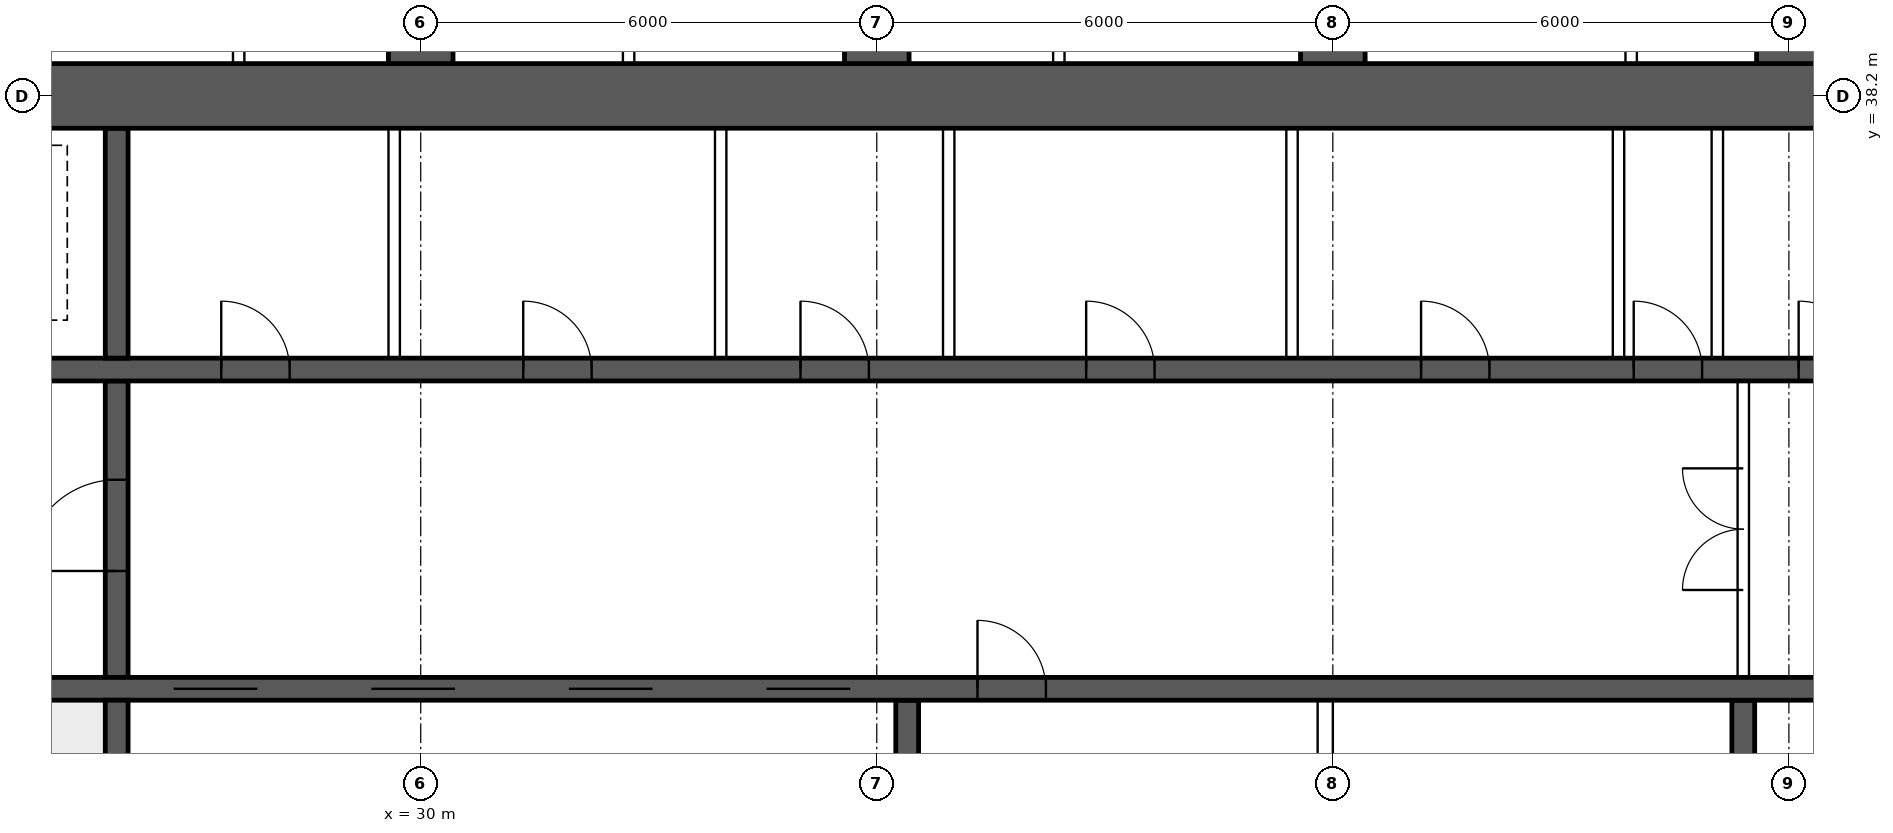
"""IFC4 building model, lengths in metres.
Left out: names, types, materials, properties, quantities, classifications, styles, units other than length and angle.
Written with IfcOpenShell. Run it as: python <this file> out.ifc"""

import sys

from ifc_helpers import new_model, si_unit, direction, frame, frame_2d, origin, place, context, subcontext, project, spatial, rectangle, extrude, element, fill, save


model = new_model("IFC4")
c1 = context("Model", 3, precision=1e-05, world=origin(), true_north=direction((0.0, 1.0)))
c2 = subcontext(c1, "Body", "Model", "MODEL_VIEW")
j1 = project(units=[si_unit("LENGTHUNIT", "METRE"), si_unit("PLANEANGLEUNIT", "RADIAN")], contexts=[c1])
p1 = place(None, origin())
s1 = spatial("IfcSite", under=j1, at=p1, CompositionType="ELEMENT")
p2 = place(p1, origin())
s2 = spatial("IfcBuilding", under=s1, at=p2, CompositionType="ELEMENT")
p3 = place(p2, frame((0.0, 0.0, 193.6)))
s3 = spatial("IfcBuildingStorey", under=s2, at=p3, CompositionType="ELEMENT", Elevation=193.6)
p4 = place(p3, frame((18.0, 38.2, 0.0), z_axis=(0.0, 0.0, 1.0), x_axis=(1.0, 0.0, 0.0)))
e1 = element("IfcWall", 1, at=p4, inside=s3, PredefinedType="SHEAR", context=c2, shape_type="SweptSolid", body=[
    extrude(rectangle(XDim=48.0, YDim=0.85, at=frame_2d((24.0, 0.0))), origin(), (0.0, 0.0, 1.0), 3.75),
])
p5 = place(p3, frame((18.425, 30.4, 0.0), z_axis=(0.0, 0.0, 1.0), x_axis=(1.0, 0.0, 0.0)))
e2 = element("IfcWall", 2, at=p5, inside=s3, PredefinedType="SHEAR", context=c2, shape_type="SweptSolid", body=[
    extrude(rectangle(XDim=47.15, YDim=0.3, at=frame_2d((23.575, 0.0))), origin(), (0.0, 0.0, 1.0), 3.75),
])
p6 = place(p5, frame((0.4, 0.0, 0.0)))
e3 = element("IfcOpeningElement", 3, at=p6, cuts=e2, PredefinedType="OPENING", context=c2, shape_type="SweptSolid", body=[
    extrude(rectangle(XDim=1.0, YDim=2.1, at=frame_2d((0.5, 1.05))), frame((0.0, 0.16, 0.0), z_axis=(0.0, -1.0, 0.0), x_axis=(1.0, 0.0, 0.0)), (0.0, 0.0, 1.0), 0.32),
])
p7 = place(p5, frame((45.75, 0.0, 0.0)))
e4 = element("IfcOpeningElement", 4, at=p7, cuts=e2, PredefinedType="OPENING", context=c2, shape_type="SweptSolid", body=[
    extrude(rectangle(XDim=1.0, YDim=2.1, at=frame_2d((0.5, 1.05))), frame((0.0, 0.16, 0.0), z_axis=(0.0, -1.0, 0.0), x_axis=(1.0, 0.0, 0.0)), (0.0, 0.0, 1.0), 0.32),
])
p8 = place(p5, frame((8.325, 0.0, 0.0)))
e5 = element("IfcOpeningElement", 5, at=p8, cuts=e2, PredefinedType="OPENING", context=c2, shape_type="SweptSolid", body=[
    extrude(rectangle(XDim=1.1, YDim=2.1, at=frame_2d((0.55, 1.05))), frame((0.0, 0.16, 0.0), z_axis=(0.0, -1.0, 0.0), x_axis=(1.0, 0.0, 0.0)), (0.0, 0.0, 1.0), 0.32),
])
p9 = place(p5, frame((10.925, 0.0, 0.0)))
e6 = element("IfcOpeningElement", 6, at=p9, cuts=e2, PredefinedType="OPENING", context=c2, shape_type="SweptSolid", body=[
    extrude(rectangle(XDim=1.1, YDim=2.1, at=frame_2d((0.55, 1.05))), frame((0.0, 0.16, 0.0), z_axis=(0.0, -1.0, 0.0), x_axis=(1.0, 0.0, 0.0)), (0.0, 0.0, 1.0), 0.32),
])
p10 = place(p5, frame((13.525, 0.0, 0.0)))
e7 = element("IfcOpeningElement", 7, at=p10, cuts=e2, PredefinedType="OPENING", context=c2, shape_type="SweptSolid", body=[
    extrude(rectangle(XDim=1.1, YDim=2.1, at=frame_2d((0.55, 1.05))), frame((0.0, 0.16, 0.0), z_axis=(0.0, -1.0, 0.0), x_axis=(1.0, 0.0, 0.0)), (0.0, 0.0, 1.0), 0.32),
])
p11 = place(p5, frame((16.125, 0.0, 0.0)))
e8 = element("IfcOpeningElement", 8, at=p11, cuts=e2, PredefinedType="OPENING", context=c2, shape_type="SweptSolid", body=[
    extrude(rectangle(XDim=1.1, YDim=2.1, at=frame_2d((0.55, 1.05))), frame((0.0, 0.16, 0.0), z_axis=(0.0, -1.0, 0.0), x_axis=(1.0, 0.0, 0.0)), (0.0, 0.0, 1.0), 0.32),
])
p12 = place(p5, frame((18.9, 0.0, 0.0)))
e9 = element("IfcOpeningElement", 9, at=p12, cuts=e2, PredefinedType="OPENING", context=c2, shape_type="SweptSolid", body=[
    extrude(rectangle(XDim=0.9, YDim=2.1, at=frame_2d((0.45, 1.05))), frame((0.0, 0.16, 0.0), z_axis=(0.0, -1.0, 0.0), x_axis=(1.0, 0.0, 0.0)), (0.0, 0.0, 1.0), 0.32),
])
p13 = place(p5, frame((30.192, 0.0, 0.0)))
e10 = element("IfcOpeningElement", 10, at=p13, cuts=e2, PredefinedType="OPENING", context=c2, shape_type="SweptSolid", body=[
    extrude(rectangle(XDim=1.1, YDim=2.1, at=frame_2d((0.55, 1.05))), frame((0.0, 0.16, 0.0), z_axis=(0.0, -1.0, 0.0), x_axis=(1.0, 0.0, 0.0)), (0.0, 0.0, 1.0), 0.32),
])
p14 = place(p5, frame((33.725, 0.0, 0.0)))
e11 = element("IfcOpeningElement", 11, at=p14, cuts=e2, PredefinedType="OPENING", context=c2, shape_type="SweptSolid", body=[
    extrude(rectangle(XDim=1.1, YDim=2.1, at=frame_2d((0.55, 1.05))), frame((0.0, 0.16, 0.0), z_axis=(0.0, -1.0, 0.0), x_axis=(1.0, 0.0, 0.0)), (0.0, 0.0, 1.0), 0.32),
])
p15 = place(p5, frame((37.258, 0.0, 0.0)))
e12 = element("IfcOpeningElement", 12, at=p15, cuts=e2, PredefinedType="OPENING", context=c2, shape_type="SweptSolid", body=[
    extrude(rectangle(XDim=1.1, YDim=2.1, at=frame_2d((0.55, 1.05))), frame((0.0, 0.16, 0.0), z_axis=(0.0, -1.0, 0.0), x_axis=(1.0, 0.0, 0.0)), (0.0, 0.0, 1.0), 0.32),
])
p16 = place(p3, frame((18.425, 34.6, 0.0), z_axis=(0.0, 0.0, 1.0), x_axis=(1.0, 0.0, 0.0)))
e13 = element("IfcWall", 13, at=p16, inside=s3, PredefinedType="SHEAR", context=c2, shape_type="SweptSolid", body=[
    extrude(rectangle(XDim=47.15, YDim=0.3, at=frame_2d((23.575, 0.0))), origin(), (0.0, 0.0, 1.0), 3.75),
])
p17 = place(p16, frame((0.9, 0.0, 0.0)))
e14 = element("IfcOpeningElement", 14, at=p17, cuts=e13, PredefinedType="OPENING", context=c2, shape_type="SweptSolid", body=[
    extrude(rectangle(XDim=1.1, YDim=2.1, at=frame_2d((0.55, 1.05))), frame((0.0, 0.16, 0.0), z_axis=(0.0, -1.0, 0.0), x_axis=(1.0, 0.0, 0.0)), (0.0, 0.0, 1.0), 0.32),
])
p18 = place(p16, frame((45.15, 0.0, 0.0)))
e15 = element("IfcOpeningElement", 15, at=p18, cuts=e13, PredefinedType="OPENING", context=c2, shape_type="SweptSolid", body=[
    extrude(rectangle(XDim=1.1, YDim=2.1, at=frame_2d((0.55, 1.05))), frame((0.0, 0.16, 0.0), z_axis=(0.0, -1.0, 0.0), x_axis=(1.0, 0.0, 0.0)), (0.0, 0.0, 1.0), 0.32),
])
p19 = place(p16, frame((4.175, 0.0, 0.0)))
e16 = element("IfcOpeningElement", 16, at=p19, cuts=e13, PredefinedType="OPENING", context=c2, shape_type="SweptSolid", body=[
    extrude(rectangle(XDim=0.9, YDim=2.1, at=frame_2d((0.45, 1.05))), frame((0.0, 0.16, 0.0), z_axis=(0.0, -1.0, 0.0), x_axis=(1.0, 0.0, 0.0)), (0.0, 0.0, 1.0), 0.32),
])
p20 = place(p16, frame((42.075, 0.0, 0.0)))
e17 = element("IfcOpeningElement", 17, at=p20, cuts=e13, PredefinedType="OPENING", context=c2, shape_type="SweptSolid", body=[
    extrude(rectangle(XDim=0.9, YDim=2.1, at=frame_2d((0.45, 1.05))), frame((0.0, 0.16, 0.0), z_axis=(0.0, -1.0, 0.0), x_axis=(1.0, 0.0, 0.0)), (0.0, 0.0, 1.0), 0.32),
])
p21 = place(p16, frame((8.95, 0.0, 0.0)))
e18 = element("IfcOpeningElement", 18, at=p21, cuts=e13, PredefinedType="OPENING", context=c2, shape_type="SweptSolid", body=[
    extrude(rectangle(XDim=0.9, YDim=2.1, at=frame_2d((0.45, 1.05))), frame((0.0, 0.16, 0.0), z_axis=(0.0, -1.0, 0.0), x_axis=(1.0, 0.0, 0.0)), (0.0, 0.0, 1.0), 0.32),
])
p22 = place(p16, frame((12.924, 0.0, 0.0)))
e19 = element("IfcOpeningElement", 19, at=p22, cuts=e13, PredefinedType="OPENING", context=c2, shape_type="SweptSolid", body=[
    extrude(rectangle(XDim=0.9, YDim=2.1, at=frame_2d((0.45, 1.05))), frame((0.0, 0.16, 0.0), z_axis=(0.0, -1.0, 0.0), x_axis=(1.0, 0.0, 0.0)), (0.0, 0.0, 1.0), 0.32),
])
p23 = place(p16, frame((16.571, 0.0, 0.0)))
e20 = element("IfcOpeningElement", 20, at=p23, cuts=e13, PredefinedType="OPENING", context=c2, shape_type="SweptSolid", body=[
    extrude(rectangle(XDim=0.9, YDim=2.1, at=frame_2d((0.45, 1.05))), frame((0.0, 0.16, 0.0), z_axis=(0.0, -1.0, 0.0), x_axis=(1.0, 0.0, 0.0)), (0.0, 0.0, 1.0), 0.32),
])
p24 = place(p16, frame((20.33, 0.0, 0.0)))
e21 = element("IfcOpeningElement", 21, at=p24, cuts=e13, PredefinedType="OPENING", context=c2, shape_type="SweptSolid", body=[
    extrude(rectangle(XDim=0.9, YDim=2.1, at=frame_2d((0.45, 1.05))), frame((0.0, 0.16, 0.0), z_axis=(0.0, -1.0, 0.0), x_axis=(1.0, 0.0, 0.0)), (0.0, 0.0, 1.0), 0.32),
])
p25 = place(p16, frame((24.736, 0.0, 0.0)))
e22 = element("IfcOpeningElement", 22, at=p25, cuts=e13, PredefinedType="OPENING", context=c2, shape_type="SweptSolid", body=[
    extrude(rectangle(XDim=0.9, YDim=2.1, at=frame_2d((0.45, 1.05))), frame((0.0, 0.16, 0.0), z_axis=(0.0, -1.0, 0.0), x_axis=(1.0, 0.0, 0.0)), (0.0, 0.0, 1.0), 0.32),
])
p26 = place(p16, frame((27.533, 0.0, 0.0)))
e23 = element("IfcOpeningElement", 23, at=p26, cuts=e13, PredefinedType="OPENING", context=c2, shape_type="SweptSolid", body=[
    extrude(rectangle(XDim=0.9, YDim=2.1, at=frame_2d((0.45, 1.05))), frame((0.0, 0.16, 0.0), z_axis=(0.0, -1.0, 0.0), x_axis=(1.0, 0.0, 0.0)), (0.0, 0.0, 1.0), 0.32),
])
p27 = place(p16, frame((29.703, 0.0, 0.0)))
e24 = element("IfcOpeningElement", 24, at=p27, cuts=e13, PredefinedType="OPENING", context=c2, shape_type="SweptSolid", body=[
    extrude(rectangle(XDim=0.9, YDim=2.1, at=frame_2d((0.45, 1.05))), frame((0.0, 0.16, 0.0), z_axis=(0.0, -1.0, 0.0), x_axis=(1.0, 0.0, 0.0)), (0.0, 0.0, 1.0), 0.32),
])
p28 = place(p16, frame((33.502, 0.0, 0.0)))
e25 = element("IfcOpeningElement", 25, at=p28, cuts=e13, PredefinedType="OPENING", context=c2, shape_type="SweptSolid", body=[
    extrude(rectangle(XDim=0.9, YDim=2.1, at=frame_2d((0.45, 1.05))), frame((0.0, 0.16, 0.0), z_axis=(0.0, -1.0, 0.0), x_axis=(1.0, 0.0, 0.0)), (0.0, 0.0, 1.0), 0.32),
])
p29 = place(p16, frame((37.453, 0.0, 0.0)))
e26 = element("IfcOpeningElement", 26, at=p29, cuts=e13, PredefinedType="OPENING", context=c2, shape_type="SweptSolid", body=[
    extrude(rectangle(XDim=0.9, YDim=2.1, at=frame_2d((0.45, 1.05))), frame((0.0, 0.16, 0.0), z_axis=(0.0, -1.0, 0.0), x_axis=(1.0, 0.0, 0.0)), (0.0, 0.0, 1.0), 0.32),
])
p30 = place(p3, frame((26.0, 26.225, 0.0), z_axis=(0.0, 0.0, 1.0), x_axis=(0.0, 1.0, 0.0)))
e27 = element("IfcWall", 27, at=p30, inside=s3, PredefinedType="SHEAR", context=c2, shape_type="SweptSolid", body=[
    extrude(rectangle(XDim=4.025, YDim=0.3, at=frame_2d((2.012, 0.0))), origin(), (0.0, 0.0, 1.0), 3.75),
])
p31 = place(p3, frame((26.0, 30.55, 0.0), z_axis=(0.0, 0.0, 1.0), x_axis=(0.0, 1.0, 0.0)))
e28 = element("IfcWall", 28, at=p31, inside=s3, PredefinedType="SHEAR", context=c2, shape_type="SweptSolid", body=[
    extrude(rectangle(XDim=3.9, YDim=0.3, at=frame_2d((1.95, 0.0))), origin(), (0.0, 0.0, 1.0), 3.75),
])
p32 = place(p31, frame((1.4, 0.0, 0.0)))
e29 = element("IfcOpeningElement", 29, at=p32, cuts=e28, PredefinedType="OPENING", context=c2, shape_type="SweptSolid", body=[
    extrude(rectangle(XDim=1.2, YDim=2.1, at=frame_2d((0.6, 1.05))), frame((0.0, 0.16, 0.0), z_axis=(0.0, -1.0, 0.0), x_axis=(1.0, 0.0, 0.0)), (0.0, 0.0, 1.0), 0.32),
])
p33 = place(p3, frame((26.0, 34.75, 0.0), z_axis=(0.0, 0.0, 1.0), x_axis=(0.0, 1.0, 0.0)))
e30 = element("IfcWall", 30, at=p33, inside=s3, PredefinedType="SHEAR", context=c2, shape_type="SweptSolid", body=[
    extrude(rectangle(XDim=3.025, YDim=0.3, at=frame_2d((1.512, 0.0))), origin(), (0.0, 0.0, 1.0), 3.75),
])
for number, where, z_axis, x_axis in (
    (31, (36.4, 26.225, 0.0), (0.0, 0.0, 1.0), (0.0, 1.0, 0.0)),
    (32, (47.4, 26.225, 0.0), (0.0, 0.0, 1.0), (0.0, 1.0, 0.0)),
):
    element("IfcWall", number, at=place(p3, frame(where, z_axis=z_axis, x_axis=x_axis)), inside=s3, PredefinedType="SHEAR", context=c2, shape_type="SweptSolid", body=[
        extrude(rectangle(XDim=4.025, YDim=0.3, at=frame_2d((2.012, 0.0))), origin(), (0.0, 0.0, 1.0), 3.75),
    ])
for number, where, z_axis, x_axis in (
    (33, (30.0, 38.625, 0.0), (0.0, 0.0, 1.0), (0.0, 1.0, 0.0)),
    (34, (36.0, 38.625, 0.0), (0.0, 0.0, 1.0), (0.0, 1.0, 0.0)),
    (35, (42.0, 38.625, 0.0), (0.0, 0.0, 1.0), (0.0, 1.0, 0.0)),
    (36, (48.0, 38.625, 0.0), (0.0, 0.0, 1.0), (0.0, 1.0, 0.0)),
):
    element("IfcWall", number, at=place(p3, frame(where, z_axis=z_axis, x_axis=x_axis)), inside=s3, PredefinedType="SHEAR", context=c2, shape_type="SweptSolid", body=[
        extrude(rectangle(XDim=8.175, YDim=0.85, at=frame_2d((4.087, 0.0))), origin(), (0.0, 0.0, 1.0), 3.75),
    ])
p34 = place(p3, frame((47.4, 30.55, 0.0), z_axis=(0.0, 0.0, 1.0), x_axis=(0.0, 1.0, 0.0)))
e37 = element("IfcWall", 37, at=p34, inside=s3, PredefinedType="SOLIDWALL", context=c2, shape_type="SweptSolid", body=[
    extrude(rectangle(XDim=3.9, YDim=0.15, at=frame_2d((1.95, 0.0))), origin(), (0.0, 0.0, 1.0), 3.5),
])
p35 = place(p34, frame((1.15, 0.0, 0.0)))
e38 = element("IfcOpeningElement", 38, at=p35, cuts=e37, PredefinedType="OPENING", context=c2, shape_type="SweptSolid", body=[
    extrude(rectangle(XDim=1.6, YDim=2.1, at=frame_2d((0.8, 1.05))), frame((0.0, 0.085, 0.0), z_axis=(0.0, -1.0, 0.0), x_axis=(1.0, 0.0, 0.0)), (0.0, 0.0, 1.0), 0.17),
])
for number, where, z_axis, x_axis in (
    (39, (29.651, 34.75, 0.0), (0.0, 0.0, 1.0), (0.0, 1.0, 0.0)),
    (40, (33.946, 34.75, 0.0), (0.0, 0.0, 1.0), (0.0, 1.0, 0.0)),
    (41, (36.946, 34.75, 0.0), (0.0, 0.0, 1.0), (0.0, 1.0, 0.0)),
    (42, (41.463, 34.75, 0.0), (0.0, 0.0, 1.0), (0.0, 1.0, 0.0)),
    (43, (45.758, 34.75, 0.0), (0.0, 0.0, 1.0), (0.0, 1.0, 0.0)),
    (44, (47.058, 34.75, 0.0), (0.0, 0.0, 1.0), (0.0, 1.0, 0.0)),
):
    element("IfcWall", number, at=place(p3, frame(where, z_axis=z_axis, x_axis=x_axis)), inside=s3, PredefinedType="SOLIDWALL", context=c2, shape_type="SweptSolid", body=[
        extrude(rectangle(XDim=3.025, YDim=0.15, at=frame_2d((1.512, 0.0))), origin(), (0.0, 0.0, 1.0), 3.5),
    ])
p36 = place(p3, frame((41.9, 26.225, 0.0), z_axis=(0.0, 0.0, 1.0), x_axis=(0.0, 1.0, 0.0)))
e45 = element("IfcWall", 45, at=p36, inside=s3, PredefinedType="SOLIDWALL", context=c2, shape_type="SweptSolid", body=[
    extrude(rectangle(XDim=4.025, YDim=0.2, at=frame_2d((2.012, 0.0))), origin(), (0.0, 0.0, 1.0), 3.5),
])
for number, where, z_axis, x_axis in (
    (46, (27.605, 38.625, 0.0), (0.0, 0.0, 1.0), (0.0, 1.0, 0.0)),
    (47, (32.735, 38.625, 0.0), (0.0, 0.0, 1.0), (0.0, 1.0, 0.0)),
    (48, (38.395, 38.625, 0.0), (0.0, 0.0, 1.0), (0.0, 1.0, 0.0)),
    (49, (45.925, 38.625, 0.0), (0.0, 0.0, 1.0), (0.0, 1.0, 0.0)),
):
    element("IfcWall", number, at=place(p3, frame(where, z_axis=z_axis, x_axis=x_axis)), inside=s3, PredefinedType="PARTITIONING", context=c2, shape_type="SweptSolid", body=[
        extrude(rectangle(XDim=8.075, YDim=0.15, at=frame_2d((4.038, 0.0))), origin(), (0.0, 0.0, 1.0), 3.5),
    ])
p37 = place(p35, origin())
e50 = element("IfcDoor", 50, at=p37, inside=s3, OperationType="DOUBLE_DOOR_SINGLE_SWING", PredefinedType="DOOR", context=c2, shape_type="SweptSolid", body=[
    extrude(rectangle(XDim=1.6, YDim=2.1, at=frame_2d((0.8, 1.05))), frame((0.0, 0.025, 0.0), z_axis=(0.0, -1.0, 0.0), x_axis=(1.0, 0.0, 0.0)), (0.0, 0.0, 1.0), 0.05),
])
fill(e38, e50)
p38 = place(p32, origin())
e51 = element("IfcDoor", 51, at=p38, inside=s3, OperationType="SINGLE_SWING_LEFT", PredefinedType="DOOR", context=c2, shape_type="SweptSolid", body=[
    extrude(rectangle(XDim=1.2, YDim=2.1, at=frame_2d((0.6, 1.05))), frame((0.0, 0.025, 0.0), z_axis=(0.0, -1.0, 0.0), x_axis=(1.0, 0.0, 0.0)), (0.0, 0.0, 1.0), 0.05),
])
fill(e29, e51)
p39 = place(p21, origin())
e52 = element("IfcDoor", 52, at=p39, inside=s3, OperationType="SINGLE_SWING_LEFT", PredefinedType="DOOR", context=c2, shape_type="SweptSolid", body=[
    extrude(rectangle(XDim=0.9, YDim=2.1, at=frame_2d((0.45, 1.05))), frame((0.0, 0.025, 0.0), z_axis=(0.0, -1.0, 0.0), x_axis=(1.0, 0.0, 0.0)), (0.0, 0.0, 1.0), 0.05),
])
fill(e18, e52)
p40 = place(p22, origin())
e53 = element("IfcDoor", 53, at=p40, inside=s3, OperationType="SINGLE_SWING_LEFT", PredefinedType="DOOR", context=c2, shape_type="SweptSolid", body=[
    extrude(rectangle(XDim=0.9, YDim=2.1, at=frame_2d((0.45, 1.05))), frame((0.0, 0.025, 0.0), z_axis=(0.0, -1.0, 0.0), x_axis=(1.0, 0.0, 0.0)), (0.0, 0.0, 1.0), 0.05),
])
fill(e19, e53)
p41 = place(p23, origin())
e54 = element("IfcDoor", 54, at=p41, inside=s3, OperationType="SINGLE_SWING_LEFT", PredefinedType="DOOR", context=c2, shape_type="SweptSolid", body=[
    extrude(rectangle(XDim=0.9, YDim=2.1, at=frame_2d((0.45, 1.05))), frame((0.0, 0.025, 0.0), z_axis=(0.0, -1.0, 0.0), x_axis=(1.0, 0.0, 0.0)), (0.0, 0.0, 1.0), 0.05),
])
fill(e20, e54)
p42 = place(p24, origin())
e55 = element("IfcDoor", 55, at=p42, inside=s3, OperationType="SINGLE_SWING_LEFT", PredefinedType="DOOR", context=c2, shape_type="SweptSolid", body=[
    extrude(rectangle(XDim=0.9, YDim=2.1, at=frame_2d((0.45, 1.05))), frame((0.0, 0.025, 0.0), z_axis=(0.0, -1.0, 0.0), x_axis=(1.0, 0.0, 0.0)), (0.0, 0.0, 1.0), 0.05),
])
fill(e21, e55)
p43 = place(p25, origin())
e56 = element("IfcDoor", 56, at=p43, inside=s3, OperationType="SINGLE_SWING_LEFT", PredefinedType="DOOR", context=c2, shape_type="SweptSolid", body=[
    extrude(rectangle(XDim=0.9, YDim=2.1, at=frame_2d((0.45, 1.05))), frame((0.0, 0.025, 0.0), z_axis=(0.0, -1.0, 0.0), x_axis=(1.0, 0.0, 0.0)), (0.0, 0.0, 1.0), 0.05),
])
fill(e22, e56)
p44 = place(p26, origin())
e57 = element("IfcDoor", 57, at=p44, inside=s3, OperationType="SINGLE_SWING_LEFT", PredefinedType="DOOR", context=c2, shape_type="SweptSolid", body=[
    extrude(rectangle(XDim=0.9, YDim=2.1, at=frame_2d((0.45, 1.05))), frame((0.0, 0.025, 0.0), z_axis=(0.0, -1.0, 0.0), x_axis=(1.0, 0.0, 0.0)), (0.0, 0.0, 1.0), 0.05),
])
fill(e23, e57)
p45 = place(p27, origin())
e58 = element("IfcDoor", 58, at=p45, inside=s3, OperationType="SINGLE_SWING_LEFT", PredefinedType="DOOR", context=c2, shape_type="SweptSolid", body=[
    extrude(rectangle(XDim=0.9, YDim=2.1, at=frame_2d((0.45, 1.05))), frame((0.0, 0.025, 0.0), z_axis=(0.0, -1.0, 0.0), x_axis=(1.0, 0.0, 0.0)), (0.0, 0.0, 1.0), 0.05),
])
fill(e24, e58)
p46 = place(p8, origin())
e59 = element("IfcDoor", 59, at=p46, inside=s3, OperationType="DOUBLE_DOOR_SLIDING", PredefinedType="DOOR", context=c2, shape_type="SweptSolid", body=[
    extrude(rectangle(XDim=1.1, YDim=2.1, at=frame_2d((0.55, 1.05))), frame((0.0, 0.025, 0.0), z_axis=(0.0, -1.0, 0.0), x_axis=(1.0, 0.0, 0.0)), (0.0, 0.0, 1.0), 0.05),
])
fill(e5, e59)
p47 = place(p9, origin())
e60 = element("IfcDoor", 60, at=p47, inside=s3, OperationType="DOUBLE_DOOR_SLIDING", PredefinedType="DOOR", context=c2, shape_type="SweptSolid", body=[
    extrude(rectangle(XDim=1.1, YDim=2.1, at=frame_2d((0.55, 1.05))), frame((0.0, 0.025, 0.0), z_axis=(0.0, -1.0, 0.0), x_axis=(1.0, 0.0, 0.0)), (0.0, 0.0, 1.0), 0.05),
])
fill(e6, e60)
p48 = place(p10, origin())
e61 = element("IfcDoor", 61, at=p48, inside=s3, OperationType="DOUBLE_DOOR_SLIDING", PredefinedType="DOOR", context=c2, shape_type="SweptSolid", body=[
    extrude(rectangle(XDim=1.1, YDim=2.1, at=frame_2d((0.55, 1.05))), frame((0.0, 0.025, 0.0), z_axis=(0.0, -1.0, 0.0), x_axis=(1.0, 0.0, 0.0)), (0.0, 0.0, 1.0), 0.05),
])
fill(e7, e61)
p49 = place(p11, origin())
e62 = element("IfcDoor", 62, at=p49, inside=s3, OperationType="DOUBLE_DOOR_SLIDING", PredefinedType="DOOR", context=c2, shape_type="SweptSolid", body=[
    extrude(rectangle(XDim=1.1, YDim=2.1, at=frame_2d((0.55, 1.05))), frame((0.0, 0.025, 0.0), z_axis=(0.0, -1.0, 0.0), x_axis=(1.0, 0.0, 0.0)), (0.0, 0.0, 1.0), 0.05),
])
fill(e8, e62)
p50 = place(p12, origin())
e63 = element("IfcDoor", 63, at=p50, inside=s3, OperationType="SINGLE_SWING_LEFT", PredefinedType="DOOR", context=c2, shape_type="SweptSolid", body=[
    extrude(rectangle(XDim=0.9, YDim=2.1, at=frame_2d((0.45, 1.05))), frame((0.0, 0.025, 0.0), z_axis=(0.0, -1.0, 0.0), x_axis=(1.0, 0.0, 0.0)), (0.0, 0.0, 1.0), 0.05),
])
fill(e9, e63)
save(model, sys.argv[1])
